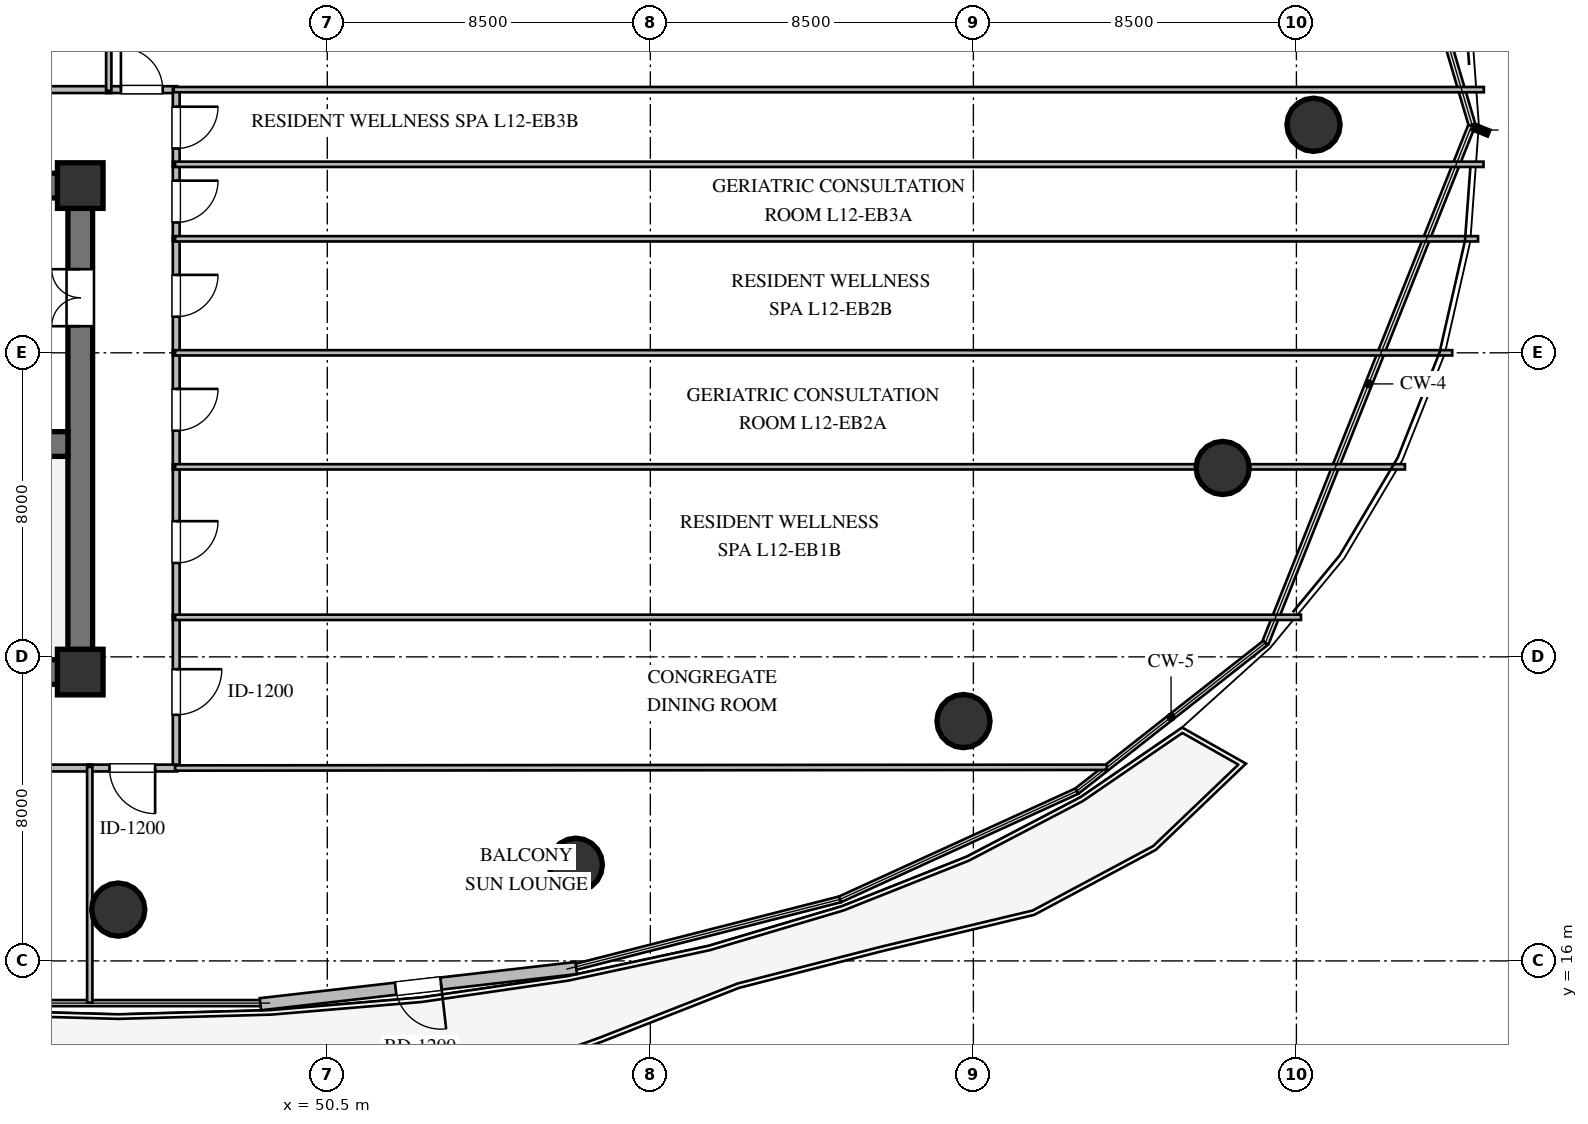
"""IFC4 building model, lengths in metres.
Left out: names, types, materials, properties, quantities, classifications, styles, units other than length and angle.
Written with IfcOpenShell. Run it as: python <this file> out.ifc"""

import sys

from ifc_helpers import new_model, si_unit, direction, frame, frame_2d, origin, origin_2d, place, context, subcontext, project, spatial, rectangle, circle, extrude, element, fill, save


model = new_model("IFC4")
c1 = context("Model", 3, precision=1e-05, world=origin(), true_north=direction((0.0, 1.0)))
c2 = subcontext(c1, "Body", "Model", "MODEL_VIEW")
j1 = project(units=[si_unit("LENGTHUNIT", "METRE"), si_unit("PLANEANGLEUNIT", "RADIAN")], contexts=[c1])
p1 = place(None, origin())
s1 = spatial("IfcSite", under=j1, at=p1, CompositionType="ELEMENT")
p2 = place(p1, origin())
s2 = spatial("IfcBuilding", under=s1, at=p2, CompositionType="ELEMENT")
p3 = place(p2, frame((0.0, 0.0, 49.2)))
s3 = spatial("IfcBuildingStorey", under=s2, at=p3, CompositionType="ELEMENT", Elevation=49.2)
for number, where, z_axis, x_axis in (
    (1, (21.675, 23.6, 0.0), (0.0, 0.0, 1.0), (1.0, 0.0, 0.0)),
    (2, (21.675, 36.4, 0.0), (0.0, 0.0, 1.0), (1.0, 0.0, 0.0)),
):
    element("IfcWall", number, at=place(p3, frame(where, z_axis=z_axis, x_axis=x_axis)), inside=s3, PredefinedType="SHEAR", context=c2, shape_type="SweptSolid", body=[
        extrude(rectangle(XDim=22.65, YDim=0.65, at=frame_2d((11.325, 0.0))), origin(), (0.0, 0.0, 1.0), 3.36),
    ])
p4 = place(p3, frame((44.0, 23.925, 0.0), z_axis=(0.0, 0.0, 1.0), x_axis=(0.0, 1.0, 0.0)))
e3 = element("IfcWall", 3, at=p4, inside=s3, PredefinedType="SHEAR", context=c2, shape_type="SweptSolid", body=[
    extrude(rectangle(XDim=12.15, YDim=0.65, at=frame_2d((6.075, 0.0))), origin(), (0.0, 0.0, 1.0), 3.36),
])
p5 = place(p4, frame((8.775, 0.0, 0.0)))
e4 = element("IfcOpeningElement", 4, at=p5, cuts=e3, PredefinedType="OPENING", context=c2, shape_type="SweptSolid", body=[
    extrude(rectangle(XDim=1.5, YDim=2.15, at=frame_2d((0.75, 1.075))), frame((0.0, 0.335, 0.0), z_axis=(0.0, -1.0, 0.0), x_axis=(1.0, 0.0, 0.0)), (0.0, 0.0, 1.0), 0.67),
])
p6 = place(p3, frame((22.325, 29.6, 0.0), z_axis=(0.0, 0.0, 1.0), x_axis=(1.0, 0.0, 0.0)))
e5 = element("IfcWall", 5, at=p6, inside=s3, PredefinedType="SHEAR", context=c2, shape_type="SweptSolid", body=[
    extrude(rectangle(XDim=21.35, YDim=0.65, at=frame_2d((10.675, 0.0))), origin(), (0.0, 0.0, 1.0), 3.36),
])
p7 = place(p6, frame((12.125, 0.0, 0.0)))
e6 = element("IfcOpeningElement", 6, at=p7, cuts=e5, PredefinedType="OPENING", context=c2, shape_type="SweptSolid", body=[
    extrude(rectangle(XDim=1.15, YDim=2.1, at=frame_2d((0.575, 1.05))), frame((0.0, 0.335, 0.0), z_axis=(0.0, -1.0, 0.0), x_axis=(1.0, 0.0, 0.0)), (0.0, 0.0, 1.0), 0.67),
])
for number, where, z_axis, x_axis in (
    (7, (44.0, 23.6, 0.0), (0.0, 0.0, 1.0), (1.0, 0.0, 0.0)),
    (8, (44.0, 36.4, 0.0), (0.0, 0.0, 1.0), (1.0, 0.0, 0.0)),
):
    element("IfcColumn", number, at=place(p3, frame(where, z_axis=z_axis, x_axis=x_axis)), inside=s3, PredefinedType="COLUMN", context=c2, shape_type="SweptSolid", body=[
        extrude(rectangle(XDim=1.2, YDim=1.2, at=origin_2d()), origin(), (0.0, 0.0, 1.0), 3.6),
    ])
for number, where, z_axis, x_axis in (
    (9, (76.45, 38.0, 0.0), (0.0, 0.0, 1.0), (1.0, 0.0, 0.0)),
    (10, (45.0, 17.35, 0.0), (0.0, 0.0, 1.0), (1.0, 0.0, 0.0)),
    (11, (57.04, 18.53, 0.0), (0.0, 0.0, 1.0), (1.0, 0.0, 0.0)),
    (12, (67.24, 22.31, 0.0), (0.0, 0.0, 1.0), (1.0, 0.0, 0.0)),
    (13, (74.06, 28.97, 0.0), (0.0, 0.0, 1.0), (1.0, 0.0, 0.0)),
):
    element("IfcColumn", number, at=place(p3, frame(where, z_axis=z_axis, x_axis=x_axis)), inside=s3, PredefinedType="COLUMN", context=c2, shape_type="SweptSolid", body=[
        extrude(circle(Radius=0.7, at=origin_2d()), origin(), (0.0, 0.0, 1.0), 3.6),
    ])
p8 = place(p3, frame((57.05, 15.812, 0.0), z_axis=(0.0, 0.0, 1.0), x_axis=(-0.993503192468, -0.113804246649, 0.0)))
e14 = element("IfcWall", 14, at=p8, inside=s3, PredefinedType="STANDARD", context=c2, shape_type="SweptSolid", body=[
    extrude(rectangle(XDim=8.365, YDim=0.32, at=frame_2d((4.182, 0.0))), origin(), (0.0, 0.0, 1.0), 3.36),
])
p9 = place(p8, frame((3.582, 0.0, 0.0)))
e15 = element("IfcOpeningElement", 15, at=p9, cuts=e14, PredefinedType="OPENING", context=c2, shape_type="SweptSolid", body=[
    extrude(rectangle(XDim=1.2, YDim=2.15, at=frame_2d((0.6, 1.075))), frame((0.0, 0.17, 0.0), z_axis=(0.0, -1.0, 0.0), x_axis=(1.0, 0.0, 0.0)), (0.0, 0.0, 1.0), 0.34),
])
p10 = place(p3, frame((39.935, 38.925, 0.0), z_axis=(0.0, 0.0, 1.0), x_axis=(1.0, 0.0, 0.0)))
e16 = element("IfcWall", 16, at=p10, inside=s3, PredefinedType="PARTITIONING", context=c2, shape_type="SweptSolid", body=[
    extrude(rectangle(XDim=4.88, YDim=0.18, at=frame_2d((2.44, 0.0))), origin(), (0.0, 0.0, 1.0), 3.36),
])
p11 = place(p10, frame((1.89, 0.0, 0.0)))
e17 = element("IfcOpeningElement", 17, at=p11, cuts=e16, PredefinedType="OPENING", context=c2, shape_type="SweptSolid", body=[
    extrude(rectangle(XDim=1.1, YDim=2.1, at=frame_2d((0.55, 1.05))), frame((0.0, 0.1, 0.0), z_axis=(0.0, -1.0, 0.0), x_axis=(1.0, 0.0, 0.0)), (0.0, 0.0, 1.0), 0.2),
])
p12 = place(p3, frame((44.685, 38.925, 0.0), z_axis=(0.0, 0.0, 1.0), x_axis=(1.0, 0.0, 0.0)))
e18 = element("IfcWall", 18, at=p12, inside=s3, PredefinedType="PARTITIONING", context=c2, shape_type="SweptSolid", body=[
    extrude(rectangle(XDim=1.87, YDim=0.18, at=frame_2d((0.935, 0.0))), origin(), (0.0, 0.0, 1.0), 3.36),
])
p13 = place(p12, frame((0.385, 0.0, 0.0)))
e19 = element("IfcOpeningElement", 19, at=p13, cuts=e18, PredefinedType="OPENING", context=c2, shape_type="SweptSolid", body=[
    extrude(rectangle(XDim=1.1, YDim=2.1, at=frame_2d((0.55, 1.05))), frame((0.0, 0.1, 0.0), z_axis=(0.0, -1.0, 0.0), x_axis=(1.0, 0.0, 0.0)), (0.0, 0.0, 1.0), 0.2),
])
p14 = place(p3, frame((46.525, 25.105, 0.0), z_axis=(0.0, 0.0, 1.0), x_axis=(0.0, -1.0, 0.0)))
e20 = element("IfcWall", 20, at=p14, inside=s3, PredefinedType="PARTITIONING", context=c2, shape_type="SweptSolid", body=[
    extrude(rectangle(XDim=4.06, YDim=0.18, at=frame_2d((2.03, 0.0))), origin(), (0.0, 0.0, 1.0), 3.36),
])
p15 = place(p14, frame((1.43, 0.0, 0.0)))
e21 = element("IfcOpeningElement", 21, at=p15, cuts=e20, PredefinedType="OPENING", context=c2, shape_type="SweptSolid", body=[
    extrude(rectangle(XDim=1.2, YDim=2.15, at=frame_2d((0.6, 1.075))), frame((0.0, 0.1, 0.0), z_axis=(0.0, -1.0, 0.0), x_axis=(1.0, 0.0, 0.0)), (0.0, 0.0, 1.0), 0.2),
])
p16 = place(p3, frame((46.525, 29.065, 0.0), z_axis=(0.0, 0.0, 1.0), x_axis=(0.0, -1.0, 0.0)))
e22 = element("IfcWall", 22, at=p16, inside=s3, PredefinedType="PARTITIONING", context=c2, shape_type="SweptSolid", body=[
    extrude(rectangle(XDim=4.09, YDim=0.18, at=frame_2d((2.045, 0.0))), origin(), (0.0, 0.0, 1.0), 3.36),
])
p17 = place(p16, frame((1.495, 0.0, 0.0)))
e23 = element("IfcOpeningElement", 23, at=p17, cuts=e22, PredefinedType="OPENING", context=c2, shape_type="SweptSolid", body=[
    extrude(rectangle(XDim=1.1, YDim=2.1, at=frame_2d((0.55, 1.05))), frame((0.0, 0.1, 0.0), z_axis=(0.0, -1.0, 0.0), x_axis=(1.0, 0.0, 0.0)), (0.0, 0.0, 1.0), 0.2),
])
p18 = place(p3, frame((46.525, 32.065, 0.0), z_axis=(0.0, 0.0, 1.0), x_axis=(0.0, -1.0, 0.0)))
e24 = element("IfcWall", 24, at=p18, inside=s3, PredefinedType="PARTITIONING", context=c2, shape_type="SweptSolid", body=[
    extrude(rectangle(XDim=3.13, YDim=0.18, at=frame_2d((1.565, 0.0))), origin(), (0.0, 0.0, 1.0), 3.36),
])
p19 = place(p18, frame((1.015, 0.0, 0.0)))
e25 = element("IfcOpeningElement", 25, at=p19, cuts=e24, PredefinedType="OPENING", context=c2, shape_type="SweptSolid", body=[
    extrude(rectangle(XDim=1.1, YDim=2.1, at=frame_2d((0.55, 1.05))), frame((0.0, 0.1, 0.0), z_axis=(0.0, -1.0, 0.0), x_axis=(1.0, 0.0, 0.0)), (0.0, 0.0, 1.0), 0.2),
])
p20 = place(p3, frame((46.525, 35.065, 0.0), z_axis=(0.0, 0.0, 1.0), x_axis=(0.0, -1.0, 0.0)))
e26 = element("IfcWall", 26, at=p20, inside=s3, PredefinedType="PARTITIONING", context=c2, shape_type="SweptSolid", body=[
    extrude(rectangle(XDim=3.13, YDim=0.18, at=frame_2d((1.565, 0.0))), origin(), (0.0, 0.0, 1.0), 3.36),
])
p21 = place(p20, frame((1.015, 0.0, 0.0)))
e27 = element("IfcOpeningElement", 27, at=p21, cuts=e26, PredefinedType="OPENING", context=c2, shape_type="SweptSolid", body=[
    extrude(rectangle(XDim=1.1, YDim=2.1, at=frame_2d((0.55, 1.05))), frame((0.0, 0.1, 0.0), z_axis=(0.0, -1.0, 0.0), x_axis=(1.0, 0.0, 0.0)), (0.0, 0.0, 1.0), 0.2),
])
p22 = place(p3, frame((46.525, 37.025, 0.0), z_axis=(0.0, 0.0, 1.0), x_axis=(0.0, -1.0, 0.0)))
e28 = element("IfcWall", 28, at=p22, inside=s3, PredefinedType="PARTITIONING", context=c2, shape_type="SweptSolid", body=[
    extrude(rectangle(XDim=2.09, YDim=0.18, at=frame_2d((1.045, 0.0))), origin(), (0.0, 0.0, 1.0), 3.36),
])
p23 = place(p22, frame((0.495, 0.0, 0.0)))
e29 = element("IfcOpeningElement", 29, at=p23, cuts=e28, PredefinedType="OPENING", context=c2, shape_type="SweptSolid", body=[
    extrude(rectangle(XDim=1.1, YDim=2.1, at=frame_2d((0.55, 1.05))), frame((0.0, 0.1, 0.0), z_axis=(0.0, -1.0, 0.0), x_axis=(1.0, 0.0, 0.0)), (0.0, 0.0, 1.0), 0.2),
])
p24 = place(p3, frame((46.525, 38.955, 0.0), z_axis=(0.0, 0.0, 1.0), x_axis=(0.0, -1.0, 0.0)))
e30 = element("IfcWall", 30, at=p24, inside=s3, PredefinedType="PARTITIONING", context=c2, shape_type="SweptSolid", body=[
    extrude(rectangle(XDim=2.06, YDim=0.18, at=frame_2d((1.03, 0.0))), origin(), (0.0, 0.0, 1.0), 3.36),
])
p25 = place(p24, frame((0.48, 0.0, 0.0)))
e31 = element("IfcOpeningElement", 31, at=p25, cuts=e30, PredefinedType="OPENING", context=c2, shape_type="SweptSolid", body=[
    extrude(rectangle(XDim=1.1, YDim=2.1, at=frame_2d((0.55, 1.05))), frame((0.0, 0.1, 0.0), z_axis=(0.0, -1.0, 0.0), x_axis=(1.0, 0.0, 0.0)), (0.0, 0.0, 1.0), 0.2),
])
p26 = place(p3, frame((44.315, 21.075, 0.0), z_axis=(0.0, 0.0, 1.0), x_axis=(-1.0, 0.0, 0.0)))
e32 = element("IfcWall", 32, at=p26, inside=s3, PredefinedType="PARTITIONING", context=c2, shape_type="SweptSolid", body=[
    extrude(rectangle(XDim=7.38, YDim=0.18, at=frame_2d((3.69, 0.0))), origin(), (0.0, 0.0, 1.0), 2.996),
])
p27 = place(p26, frame((3.14, 0.0, 0.0)))
e33 = element("IfcOpeningElement", 33, at=p27, cuts=e32, PredefinedType="OPENING", context=c2, shape_type="SweptSolid", body=[
    extrude(rectangle(XDim=1.1, YDim=2.1, at=frame_2d((0.55, 1.05))), frame((0.0, 0.1, 0.0), z_axis=(0.0, -1.0, 0.0), x_axis=(1.0, 0.0, 0.0)), (0.0, 0.0, 1.0), 0.2),
])
p28 = place(p3, frame((46.555, 21.075, 0.0), z_axis=(0.0, 0.0, 1.0), x_axis=(-1.0, 0.0, 0.0)))
e34 = element("IfcWall", 34, at=p28, inside=s3, PredefinedType="PARTITIONING", context=c2, shape_type="SweptSolid", body=[
    extrude(rectangle(XDim=2.37, YDim=0.18, at=frame_2d((1.185, 0.0))), origin(), (0.0, 0.0, 1.0), 3.36),
])
p29 = place(p28, frame((0.585, 0.0, 0.0)))
e35 = element("IfcOpeningElement", 35, at=p29, cuts=e34, PredefinedType="OPENING", context=c2, shape_type="SweptSolid", body=[
    extrude(rectangle(XDim=1.2, YDim=2.15, at=frame_2d((0.6, 1.075))), frame((0.0, 0.1, 0.0), z_axis=(0.0, -1.0, 0.0), x_axis=(1.0, 0.0, 0.0)), (0.0, 0.0, 1.0), 0.2),
])
p30 = place(p3, frame((44.75, 67.311, 0.0), z_axis=(0.0, 0.0, 1.0), x_axis=(0.0, -1.0, 0.0)))
e36 = element("IfcWall", 36, at=p30, inside=s3, PredefinedType="PARTITIONING", context=c2, shape_type="SweptSolid", body=[
    extrude(rectangle(XDim=28.416, YDim=0.14, at=frame_2d((14.208, 0.0))), origin(), (0.0, 0.0, 1.0), 2.806),
])
p31 = place(p3, frame((80.932, 38.925, 0.0), z_axis=(0.0, 0.0, 1.0), x_axis=(-1.0, 0.0, 0.0)))
e37 = element("IfcWall", 37, at=p31, inside=s3, PredefinedType="PARTITIONING", context=c2, shape_type="SweptSolid", body=[
    extrude(rectangle(XDim=34.472, YDim=0.14, at=frame_2d((17.236, 0.0))), origin(), (0.0, 0.0, 1.0), 3.36),
])
p32 = place(p3, frame((46.495, 25.04, 0.0), z_axis=(0.0, 0.0, 1.0), x_axis=(1.0, 0.0, 0.0)))
e38 = element("IfcWall", 38, at=p32, inside=s3, PredefinedType="PARTITIONING", context=c2, shape_type="SweptSolid", body=[
    extrude(rectangle(XDim=29.625, YDim=0.14, at=frame_2d((14.812, 0.0))), origin(), (0.0, 0.0, 1.0), 2.806),
])
p33 = place(p3, frame((71.011, 21.094, 0.0), z_axis=(0.0, 0.0, 1.0), x_axis=(-0.999999682646, -0.000796685534, 0.0)))
e39 = element("IfcWall", 39, at=p33, inside=s3, PredefinedType="PARTITIONING", context=c2, shape_type="SweptSolid", body=[
    extrude(rectangle(XDim=24.516, YDim=0.14, at=frame_2d((12.258, 0.0))), origin(), (0.0, 0.0, 1.0), 2.996),
])
p34 = place(p3, frame((46.495, 29.0, 0.0), z_axis=(0.0, 0.0, 1.0), x_axis=(1.0, 0.0, 0.0)))
e40 = element("IfcWall", 40, at=p34, inside=s3, PredefinedType="PARTITIONING", context=c2, shape_type="SweptSolid", body=[
    extrude(rectangle(XDim=32.361, YDim=0.14, at=frame_2d((16.18, 0.0))), origin(), (0.0, 0.0, 1.0), 2.806),
])
p35 = place(p3, frame((46.495, 32.0, 0.0), z_axis=(0.0, 0.0, 1.0), x_axis=(1.0, 0.0, 0.0)))
e41 = element("IfcWall", 41, at=p35, inside=s3, PredefinedType="PARTITIONING", context=c2, shape_type="SweptSolid", body=[
    extrude(rectangle(XDim=33.605, YDim=0.14, at=frame_2d((16.802, 0.0))), origin(), (0.0, 0.0, 1.0), 3.36),
])
p36 = place(p3, frame((46.495, 35.0, 0.0), z_axis=(0.0, 0.0, 1.0), x_axis=(1.0, 0.0, 0.0)))
e42 = element("IfcWall", 42, at=p36, inside=s3, PredefinedType="PARTITIONING", context=c2, shape_type="SweptSolid", body=[
    extrude(rectangle(XDim=34.284, YDim=0.14, at=frame_2d((17.142, 0.0))), origin(), (0.0, 0.0, 1.0), 3.36),
])
p37 = place(p3, frame((46.495, 36.96, 0.0), z_axis=(0.0, 0.0, 1.0), x_axis=(1.0, 0.0, 0.0)))
e43 = element("IfcWall", 43, at=p37, inside=s3, PredefinedType="PARTITIONING", context=c2, shape_type="SweptSolid", body=[
    extrude(rectangle(XDim=34.428, YDim=0.14, at=frame_2d((17.214, 0.0))), origin(), (0.0, 0.0, 1.0), 2.806),
])
p38 = place(p3, frame((44.25, 21.105, 0.0), z_axis=(0.0, 0.0, 1.0), x_axis=(0.0, -1.0, 0.0)))
e44 = element("IfcWall", 44, at=p38, inside=s3, PredefinedType="PARTITIONING", context=c2, shape_type="SweptSolid", body=[
    extrude(rectangle(XDim=6.205, YDim=0.14, at=frame_2d((3.103, 0.0))), origin(), (0.0, 0.0, 1.0), 2.806),
])
p39 = place(p9, origin())
e45 = element("IfcDoor", 45, at=p39, inside=s3, OperationType="SINGLE_SWING_LEFT", PredefinedType="DOOR", context=c2, shape_type="SweptSolid", body=[
    extrude(rectangle(XDim=1.2, YDim=2.15, at=frame_2d((0.6, 1.075))), frame((0.0, 0.025, 0.0), z_axis=(0.0, -1.0, 0.0), x_axis=(1.0, 0.0, 0.0)), (0.0, 0.0, 1.0), 0.05),
])
fill(e15, e45)
p40 = place(p5, origin())
e46 = element("IfcDoor", 46, at=p40, inside=s3, OperationType="DOUBLE_DOOR_SINGLE_SWING", PredefinedType="DOOR", context=c2, shape_type="SweptSolid", body=[
    extrude(rectangle(XDim=1.5, YDim=2.15, at=frame_2d((0.75, 1.075))), frame((0.0, 0.025, 0.0), z_axis=(0.0, -1.0, 0.0), x_axis=(1.0, 0.0, 0.0)), (0.0, 0.0, 1.0), 0.05),
])
fill(e4, e46)
p41 = place(p13, origin())
e47 = element("IfcDoor", 47, at=p41, inside=s3, OperationType="SINGLE_SWING_LEFT", PredefinedType="DOOR", context=c2, shape_type="SweptSolid", body=[
    extrude(rectangle(XDim=1.1, YDim=2.1, at=frame_2d((0.55, 1.05))), frame((0.0, 0.025, 0.0), z_axis=(0.0, -1.0, 0.0), x_axis=(1.0, 0.0, 0.0)), (0.0, 0.0, 1.0), 0.05),
])
fill(e19, e47)
p42 = place(p15, origin())
e48 = element("IfcDoor", 48, at=p42, inside=s3, OperationType="SINGLE_SWING_LEFT", PredefinedType="DOOR", context=c2, shape_type="SweptSolid", body=[
    extrude(rectangle(XDim=1.2, YDim=2.15, at=frame_2d((0.6, 1.075))), frame((0.0, 0.025, 0.0), z_axis=(0.0, -1.0, 0.0), x_axis=(1.0, 0.0, 0.0)), (0.0, 0.0, 1.0), 0.05),
])
fill(e21, e48)
p43 = place(p17, origin())
e49 = element("IfcDoor", 49, at=p43, inside=s3, OperationType="SINGLE_SWING_LEFT", PredefinedType="DOOR", context=c2, shape_type="SweptSolid", body=[
    extrude(rectangle(XDim=1.1, YDim=2.1, at=frame_2d((0.55, 1.05))), frame((0.0, 0.025, 0.0), z_axis=(0.0, -1.0, 0.0), x_axis=(1.0, 0.0, 0.0)), (0.0, 0.0, 1.0), 0.05),
])
fill(e23, e49)
p44 = place(p19, origin())
e50 = element("IfcDoor", 50, at=p44, inside=s3, OperationType="SINGLE_SWING_LEFT", PredefinedType="DOOR", context=c2, shape_type="SweptSolid", body=[
    extrude(rectangle(XDim=1.1, YDim=2.1, at=frame_2d((0.55, 1.05))), frame((0.0, 0.025, 0.0), z_axis=(0.0, -1.0, 0.0), x_axis=(1.0, 0.0, 0.0)), (0.0, 0.0, 1.0), 0.05),
])
fill(e25, e50)
p45 = place(p21, origin())
e51 = element("IfcDoor", 51, at=p45, inside=s3, OperationType="SINGLE_SWING_LEFT", PredefinedType="DOOR", context=c2, shape_type="SweptSolid", body=[
    extrude(rectangle(XDim=1.1, YDim=2.1, at=frame_2d((0.55, 1.05))), frame((0.0, 0.025, 0.0), z_axis=(0.0, -1.0, 0.0), x_axis=(1.0, 0.0, 0.0)), (0.0, 0.0, 1.0), 0.05),
])
fill(e27, e51)
p46 = place(p23, origin())
e52 = element("IfcDoor", 52, at=p46, inside=s3, OperationType="SINGLE_SWING_LEFT", PredefinedType="DOOR", context=c2, shape_type="SweptSolid", body=[
    extrude(rectangle(XDim=1.1, YDim=2.1, at=frame_2d((0.55, 1.05))), frame((0.0, 0.025, 0.0), z_axis=(0.0, -1.0, 0.0), x_axis=(1.0, 0.0, 0.0)), (0.0, 0.0, 1.0), 0.05),
])
fill(e29, e52)
p47 = place(p25, origin())
e53 = element("IfcDoor", 53, at=p47, inside=s3, OperationType="SINGLE_SWING_LEFT", PredefinedType="DOOR", context=c2, shape_type="SweptSolid", body=[
    extrude(rectangle(XDim=1.1, YDim=2.1, at=frame_2d((0.55, 1.05))), frame((0.0, 0.025, 0.0), z_axis=(0.0, -1.0, 0.0), x_axis=(1.0, 0.0, 0.0)), (0.0, 0.0, 1.0), 0.05),
])
fill(e31, e53)
p48 = place(p29, origin())
e54 = element("IfcDoor", 54, at=p48, inside=s3, OperationType="SINGLE_SWING_LEFT", PredefinedType="DOOR", context=c2, shape_type="SweptSolid", body=[
    extrude(rectangle(XDim=1.2, YDim=2.15, at=frame_2d((0.6, 1.075))), frame((0.0, 0.025, 0.0), z_axis=(0.0, -1.0, 0.0), x_axis=(1.0, 0.0, 0.0)), (0.0, 0.0, 1.0), 0.05),
])
fill(e35, e54)
save(model, sys.argv[1])
